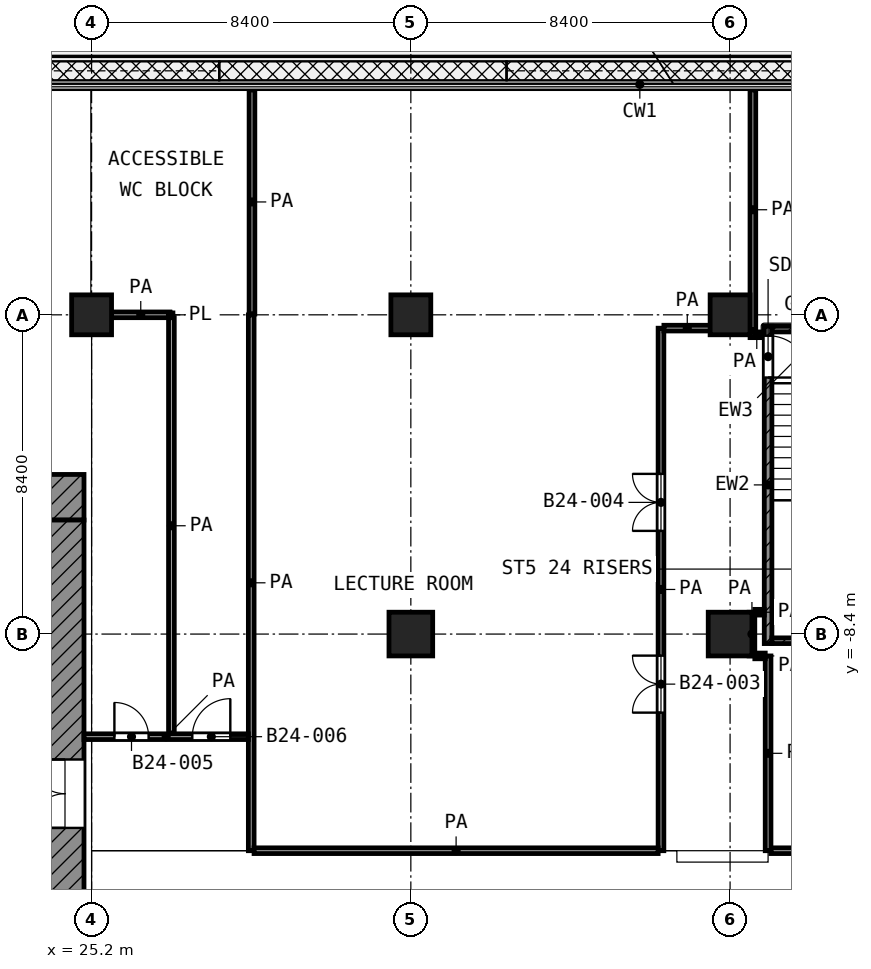
"""IFC4 building model, lengths in metres.
Left out: names, types, materials, properties, quantities, classifications, styles, units other than length and angle.
Written with IfcOpenShell. Run it as: python <this file> out.ifc"""

import sys

from ifc_helpers import new_model, si_unit, direction, frame, frame_2d, origin, origin_2d, place, context, subcontext, project, spatial, rectangle, extrude, element, fill, save


model = new_model("IFC4")
c1 = context("Model", 3, precision=1e-05, world=origin(), true_north=direction((0.0, 1.0)))
c2 = subcontext(c1, "Body", "Model", "MODEL_VIEW")
j1 = project(units=[si_unit("LENGTHUNIT", "METRE"), si_unit("PLANEANGLEUNIT", "RADIAN")], contexts=[c1])
p1 = place(None, origin())
s1 = spatial("IfcSite", under=j1, at=p1, CompositionType="ELEMENT")
p2 = place(p1, origin())
s2 = spatial("IfcBuilding", under=s1, at=p2, CompositionType="ELEMENT")
p3 = place(p2, frame((0.0, 0.0, 107.2)))
s3 = spatial("IfcBuildingStorey", under=s2, at=p3, CompositionType="ELEMENT", Elevation=107.2)
for number, where, z_axis, x_axis in (
    (1, (25.2, 0.0, 0.0), (0.0, 0.0, 1.0), (1.0, 0.0, 0.0)),
    (2, (33.6, 0.0, 0.0), (0.0, 0.0, 1.0), (1.0, 0.0, 0.0)),
    (3, (42.0, 0.0, 0.0), (0.0, 0.0, 1.0), (1.0, 0.0, 0.0)),
):
    element("IfcColumn", number, at=place(p3, frame(where, z_axis=z_axis, x_axis=x_axis)), inside=s3, PredefinedType="COLUMN", context=c2, shape_type="SweptSolid", body=[
        extrude(rectangle(XDim=1.05, YDim=1.05, at=origin_2d()), origin(), (0.0, 0.0, 1.0), 4.2),
    ])
for number, where, z_axis, x_axis in (
    (4, (33.6, -8.4, 0.0), (0.0, 0.0, 1.0), (1.0, 0.0, 0.0)),
    (5, (42.0, -8.4, 0.0), (0.0, 0.0, 1.0), (1.0, 0.0, 0.0)),
):
    element("IfcColumn", number, at=place(p3, frame(where, z_axis=z_axis, x_axis=x_axis)), inside=s3, PredefinedType="COLUMN", context=c2, shape_type="SweptSolid", body=[
        extrude(rectangle(XDim=1.15, YDim=1.15, at=origin_2d()), origin(), (0.0, 0.0, 1.0), 4.2),
    ])
p4 = place(p3, frame((4.2, -4.8, 0.0), z_axis=(0.0, 0.0, 1.0), x_axis=(1.0, 0.0, 0.0)))
e6 = element("IfcWall", 6, at=p4, inside=s3, PredefinedType="SHEAR", context=c2, shape_type="SweptSolid", body=[
    extrude(rectangle(XDim=20.8, YDim=1.2, at=frame_2d((10.4, 0.0))), origin(), (0.0, 0.0, 1.0), 3.6),
])
p5 = place(p4, frame((1.95, 0.0, 0.0)))
e7 = element("IfcOpeningElement", 7, at=p5, cuts=e6, PredefinedType="OPENING", context=c2, shape_type="SweptSolid", body=[
    extrude(rectangle(XDim=1.1, YDim=2.1, at=frame_2d((0.55, 1.05))), frame((0.0, 0.61, 0.0), z_axis=(0.0, -1.0, 0.0), x_axis=(1.0, 0.0, 0.0)), (0.0, 0.0, 1.0), 1.22),
])
p6 = place(p4, frame((17.95, 0.0, 0.0)))
e8 = element("IfcOpeningElement", 8, at=p6, cuts=e6, PredefinedType="OPENING", context=c2, shape_type="SweptSolid", body=[
    extrude(rectangle(XDim=1.1, YDim=2.1, at=frame_2d((0.55, 1.05))), frame((0.0, 0.61, 0.0), z_axis=(0.0, -1.0, 0.0), x_axis=(1.0, 0.0, 0.0)), (0.0, 0.0, 1.0), 1.22),
])
p7 = place(p3, frame((24.5, -24.0, 0.0), z_axis=(0.0, 0.0, 1.0), x_axis=(0.0, 1.0, 0.0)))
e9 = element("IfcWall", 9, at=p7, inside=s3, PredefinedType="SHEAR", context=c2, shape_type="SweptSolid", body=[
    extrude(rectangle(XDim=18.6, YDim=1.0, at=frame_2d((9.3, 0.0))), origin(), (0.0, 0.0, 1.0), 3.6),
])
p8 = place(p7, frame((10.5, 0.0, 0.0)))
e10 = element("IfcOpeningElement", 10, at=p8, cuts=e9, PredefinedType="OPENING", context=c2, shape_type="SweptSolid", body=[
    extrude(rectangle(XDim=1.8, YDim=2.1, at=frame_2d((0.9, 1.05))), frame((0.0, 0.51, 0.0), z_axis=(0.0, -1.0, 0.0), x_axis=(1.0, 0.0, 0.0)), (0.0, 0.0, 1.0), 1.02),
])
p9 = place(p3, frame((43.0, -8.65, 0.0), z_axis=(0.0, 0.0, 1.0), x_axis=(0.0, 1.0, 0.0)))
e11 = element("IfcWall", 11, at=p9, inside=s3, PredefinedType="SHEAR", context=c2, shape_type="SweptSolid", body=[
    extrude(rectangle(XDim=8.35, YDim=0.2, at=frame_2d((4.175, 0.0))), origin(), (0.0, 0.0, 1.0), 3.6),
])
p10 = place(p9, frame((7.0, 0.0, 0.0)))
e12 = element("IfcOpeningElement", 12, at=p10, cuts=e11, PredefinedType="OPENING", context=c2, shape_type="SweptSolid", body=[
    extrude(rectangle(XDim=1.1, YDim=2.1, at=frame_2d((0.55, 1.05))), frame((0.0, 0.11, 0.0), z_axis=(0.0, -1.0, 0.0), x_axis=(1.0, 0.0, 0.0)), (0.0, 0.0, 1.0), 0.22),
])
for number, where, z_axis, x_axis in (
    (13, (43.1, -0.375, 0.0), (0.0, 0.0, 1.0), (1.0, 0.0, 0.0)),
    (14, (43.1, -8.575, 0.0), (0.0, 0.0, 1.0), (1.0, 0.0, 0.0)),
):
    element("IfcWall", number, at=place(p3, frame(where, z_axis=z_axis, x_axis=x_axis)), inside=s3, PredefinedType="SHEAR", context=c2, shape_type="SweptSolid", body=[
        extrude(rectangle(XDim=2.85, YDim=0.15, at=frame_2d((1.425, 0.0))), origin(), (0.0, 0.0, 1.0), 3.6),
    ])
p11 = place(p3, frame((27.22, 0.0, 0.0), z_axis=(0.0, 0.0, 1.0), x_axis=(1.0, 0.0, 0.0)))
e15 = element("IfcWall", 15, at=p11, inside=s3, PredefinedType="PARTITIONING", context=c2, shape_type="SweptSolid", body=[
    extrude(rectangle(XDim=0.12, YDim=0.1, at=frame_2d((0.06, 0.0))), origin(), (0.0, 0.0, 1.0), 3.6),
])
p12 = place(p3, frame((29.475, -14.1, 0.0), z_axis=(0.0, 0.0, 1.0), x_axis=(1.0, 0.0, 0.0)))
e16 = element("IfcWall", 16, at=p12, inside=s3, PredefinedType="PARTITIONING", context=c2, shape_type="SweptSolid", body=[
    extrude(rectangle(XDim=10.632, YDim=0.15, at=frame_2d((5.316, 0.0))), origin(), (0.0, 0.0, 1.0), 3.6),
])
p13 = place(p3, frame((43.075, -14.1, 0.0), z_axis=(0.0, 0.0, 1.0), x_axis=(1.0, 0.0, 0.0)))
e17 = element("IfcWall", 17, at=p13, inside=s3, PredefinedType="PARTITIONING", context=c2, shape_type="SweptSolid", body=[
    extrude(rectangle(XDim=5.375, YDim=0.15, at=frame_2d((2.688, 0.0))), origin(), (0.0, 0.0, 1.0), 3.6),
])
p14 = place(p13, frame((2.188, 0.0, 0.0)))
e18 = element("IfcOpeningElement", 18, at=p14, cuts=e17, PredefinedType="OPENING", context=c2, shape_type="SweptSolid", body=[
    extrude(rectangle(XDim=1.0, YDim=2.1, at=frame_2d((0.5, 1.05))), frame((0.0, 0.085, 0.0), z_axis=(0.0, -1.0, 0.0), x_axis=(1.0, 0.0, 0.0)), (0.0, 0.0, 1.0), 0.17),
])
p15 = place(p3, frame((25.0, -11.1, 0.0), z_axis=(0.0, 0.0, 1.0), x_axis=(1.0, 0.0, 0.0)))
e19 = element("IfcWall", 19, at=p15, inside=s3, PredefinedType="PARTITIONING", context=c2, shape_type="SweptSolid", body=[
    extrude(rectangle(XDim=4.325, YDim=0.15, at=frame_2d((2.163, 0.0))), origin(), (0.0, 0.0, 1.0), 3.6),
])
p16 = place(p15, frame((0.8, 0.0, 0.0)))
e20 = element("IfcOpeningElement", 20, at=p16, cuts=e19, PredefinedType="OPENING", context=c2, shape_type="SweptSolid", body=[
    extrude(rectangle(XDim=0.9, YDim=2.1, at=frame_2d((0.45, 1.05))), frame((0.0, 0.085, 0.0), z_axis=(0.0, -1.0, 0.0), x_axis=(1.0, 0.0, 0.0)), (0.0, 0.0, 1.0), 0.17),
])
p17 = place(p15, frame((2.85, 0.0, 0.0)))
e21 = element("IfcOpeningElement", 21, at=p17, cuts=e19, PredefinedType="OPENING", context=c2, shape_type="SweptSolid", body=[
    extrude(rectangle(XDim=1.0, YDim=2.1, at=frame_2d((0.5, 1.05))), frame((0.0, 0.085, 0.0), z_axis=(0.0, -1.0, 0.0), x_axis=(1.0, 0.0, 0.0)), (0.0, 0.0, 1.0), 0.17),
])
p18 = place(p3, frame((42.651, -8.975, 0.0), z_axis=(0.0, 0.0, 1.0), x_axis=(1.0, 0.0, 0.0)))
e22 = element("IfcWall", 22, at=p18, inside=s3, PredefinedType="PARTITIONING", context=c2, shape_type="SweptSolid", body=[
    extrude(rectangle(XDim=0.274, YDim=0.15, at=frame_2d((0.137, 0.0))), origin(), (0.0, 0.0, 1.0), 3.6),
])
p19 = place(p3, frame((42.651, -7.825, 0.0), z_axis=(0.0, 0.0, 1.0), x_axis=(1.0, 0.0, 0.0)))
e23 = element("IfcWall", 23, at=p19, inside=s3, PredefinedType="PARTITIONING", context=c2, shape_type="SweptSolid", body=[
    extrude(rectangle(XDim=0.249, YDim=0.15, at=frame_2d((0.125, 0.0))), origin(), (0.0, 0.0, 1.0), 3.6),
])
p20 = place(p3, frame((42.526, -0.525, 0.0), z_axis=(0.0, 0.0, 1.0), x_axis=(1.0, 0.0, 0.0)))
e24 = element("IfcWall", 24, at=p20, inside=s3, PredefinedType="PARTITIONING", context=c2, shape_type="SweptSolid", body=[
    extrude(rectangle(XDim=0.353, YDim=0.15, at=frame_2d((0.177, 0.0))), origin(), (0.0, 0.0, 1.0), 3.6),
])
p21 = place(p3, frame((40.259, -0.35, 0.0), z_axis=(0.0, 0.0, 1.0), x_axis=(1.0, 0.0, 0.0)))
e25 = element("IfcWall", 25, at=p21, inside=s3, PredefinedType="PARTITIONING", context=c2, shape_type="SweptSolid", body=[
    extrude(rectangle(XDim=1.229, YDim=0.15, at=frame_2d((0.615, 0.0))), origin(), (0.0, 0.0, 1.0), 3.6),
])
p22 = place(p3, frame((25.727, 0.0, 0.0), z_axis=(0.0, 0.0, 1.0), x_axis=(1.0, 0.0, 0.0)))
e26 = element("IfcWall", 26, at=p22, inside=s3, PredefinedType="PARTITIONING", context=c2, shape_type="SweptSolid", body=[
    extrude(rectangle(XDim=1.533, YDim=0.15, at=frame_2d((0.767, 0.0))), origin(), (0.0, 0.0, 1.0), 3.6),
])
p23 = place(p3, frame((27.3, -11.025, 0.0), z_axis=(0.0, 0.0, 1.0), x_axis=(0.0, 1.0, 0.0)))
e27 = element("IfcWall", 27, at=p23, inside=s3, PredefinedType="PARTITIONING", context=c2, shape_type="SweptSolid", body=[
    extrude(rectangle(XDim=10.95, YDim=0.15, at=frame_2d((5.475, 0.0))), origin(), (0.0, 0.0, 1.0), 3.6),
])
p24 = place(p3, frame((29.4, -14.1, 0.0), z_axis=(0.0, 0.0, 1.0), x_axis=(0.0, 1.0, 0.0)))
e28 = element("IfcWall", 28, at=p24, inside=s3, PredefinedType="PARTITIONING", context=c2, shape_type="SweptSolid", body=[
    extrude(rectangle(XDim=14.098, YDim=0.15, at=frame_2d((7.049, 0.0))), origin(), (0.0, 0.0, 1.0), 3.6),
])
p25 = place(p3, frame((29.42, 0.02, 0.0), z_axis=(0.0, 0.0, 1.0), x_axis=(0.0, 1.0, 0.0)))
e29 = element("IfcWall", 29, at=p25, inside=s3, PredefinedType="PARTITIONING", context=c2, shape_type="SweptSolid", body=[
    extrude(rectangle(XDim=5.9, YDim=0.15, at=frame_2d((2.95, 0.0))), origin(), (0.0, 0.0, 1.0), 3.6),
])
p26 = place(p3, frame((40.182, -14.1, 0.0), z_axis=(0.0, 0.0, 1.0), x_axis=(0.0, 1.0, 0.0)))
e30 = element("IfcWall", 30, at=p26, inside=s3, PredefinedType="PARTITIONING", context=c2, shape_type="SweptSolid", body=[
    extrude(rectangle(XDim=13.748, YDim=0.15, at=frame_2d((6.874, 0.0))), origin(), (0.0, 0.0, 1.0), 3.6),
])
p27 = place(p26, frame((3.633, 0.0, 0.0)))
e31 = element("IfcOpeningElement", 31, at=p27, cuts=e30, PredefinedType="OPENING", context=c2, shape_type="SweptSolid", body=[
    extrude(rectangle(XDim=1.5, YDim=2.1, at=frame_2d((0.75, 1.05))), frame((0.0, 0.085, 0.0), z_axis=(0.0, -1.0, 0.0), x_axis=(1.0, 0.0, 0.0)), (0.0, 0.0, 1.0), 0.17),
])
p28 = place(p26, frame((8.415, 0.0, 0.0)))
e32 = element("IfcOpeningElement", 32, at=p28, cuts=e30, PredefinedType="OPENING", context=c2, shape_type="SweptSolid", body=[
    extrude(rectangle(XDim=1.5, YDim=2.1, at=frame_2d((0.75, 1.05))), frame((0.0, 0.085, 0.0), z_axis=(0.0, -1.0, 0.0), x_axis=(1.0, 0.0, 0.0)), (0.0, 0.0, 1.0), 0.17),
])
p29 = place(p3, frame((42.575, -8.974, 0.0), z_axis=(0.0, 0.0, 1.0), x_axis=(0.0, 1.0, 0.0)))
e33 = element("IfcWall", 33, at=p29, inside=s3, PredefinedType="PARTITIONING", context=c2, shape_type="SweptSolid", body=[
    extrude(rectangle(XDim=1.148, YDim=0.15, at=frame_2d((0.574, 0.0))), origin(), (0.0, 0.0, 1.0), 3.6),
])
p30 = place(p3, frame((42.6, -0.39, 0.0), z_axis=(0.0, 0.0, 1.0), x_axis=(0.0, 1.0, 0.0)))
e34 = element("IfcWall", 34, at=p30, inside=s3, PredefinedType="PARTITIONING", context=c2, shape_type="SweptSolid", body=[
    extrude(rectangle(XDim=6.31, YDim=0.15, at=frame_2d((3.155, 0.0))), origin(), (0.0, 0.0, 1.0), 3.6),
])
p31 = place(p3, frame((43.0, -14.1, 0.0), z_axis=(0.0, 0.0, 1.0), x_axis=(0.0, 1.0, 0.0)))
e35 = element("IfcWall", 35, at=p31, inside=s3, PredefinedType="PARTITIONING", context=c2, shape_type="SweptSolid", body=[
    extrude(rectangle(XDim=5.125, YDim=0.15, at=frame_2d((2.562, 0.0))), origin(), (0.0, 0.0, 1.0), 3.6),
])
p32 = place(p8, origin())
e36 = element("IfcDoor", 36, at=p32, inside=s3, OperationType="DOUBLE_DOOR_SINGLE_SWING", PredefinedType="DOOR", context=c2, shape_type="SweptSolid", body=[
    extrude(rectangle(XDim=1.8, YDim=2.1, at=frame_2d((0.9, 1.05))), frame((0.0, 0.025, 0.0), z_axis=(0.0, -1.0, 0.0), x_axis=(1.0, 0.0, 0.0)), (0.0, 0.0, 1.0), 0.05),
])
fill(e10, e36)
p33 = place(p10, frame((1.1, 0.0, 0.0), z_axis=(0.0, 0.0, 1.0), x_axis=(-1.0, 0.0, 0.0)))
e37 = element("IfcDoor", 37, at=p33, inside=s3, OperationType="SINGLE_SWING_LEFT", PredefinedType="DOOR", context=c2, shape_type="SweptSolid", body=[
    extrude(rectangle(XDim=1.1, YDim=2.1, at=frame_2d((0.55, 1.05))), frame((0.0, 0.025, 0.0), z_axis=(0.0, -1.0, 0.0), x_axis=(1.0, 0.0, 0.0)), (0.0, 0.0, 1.0), 0.05),
])
fill(e12, e37)
p34 = place(p16, origin())
e38 = element("IfcDoor", 38, at=p34, inside=s3, OperationType="SINGLE_SWING_LEFT", PredefinedType="DOOR", context=c2, shape_type="SweptSolid", body=[
    extrude(rectangle(XDim=0.9, YDim=2.1, at=frame_2d((0.45, 1.05))), frame((0.0, 0.025, 0.0), z_axis=(0.0, -1.0, 0.0), x_axis=(1.0, 0.0, 0.0)), (0.0, 0.0, 1.0), 0.05),
])
fill(e20, e38)
p35 = place(p17, origin())
e39 = element("IfcDoor", 39, at=p35, inside=s3, OperationType="SINGLE_SWING_RIGHT", PredefinedType="DOOR", context=c2, shape_type="SweptSolid", body=[
    extrude(rectangle(XDim=1.0, YDim=2.1, at=frame_2d((0.5, 1.05))), frame((0.0, 0.025, 0.0), z_axis=(0.0, -1.0, 0.0), x_axis=(1.0, 0.0, 0.0)), (0.0, 0.0, 1.0), 0.05),
])
fill(e21, e39)
p36 = place(p27, origin())
e40 = element("IfcDoor", 40, at=p36, inside=s3, OperationType="DOUBLE_DOOR_SINGLE_SWING", PredefinedType="DOOR", context=c2, shape_type="SweptSolid", body=[
    extrude(rectangle(XDim=1.5, YDim=2.1, at=frame_2d((0.75, 1.05))), frame((0.0, 0.025, 0.0), z_axis=(0.0, -1.0, 0.0), x_axis=(1.0, 0.0, 0.0)), (0.0, 0.0, 1.0), 0.05),
])
fill(e31, e40)
p37 = place(p28, origin())
e41 = element("IfcDoor", 41, at=p37, inside=s3, OperationType="DOUBLE_DOOR_SINGLE_SWING", PredefinedType="DOOR", context=c2, shape_type="SweptSolid", body=[
    extrude(rectangle(XDim=1.5, YDim=2.1, at=frame_2d((0.75, 1.05))), frame((0.0, 0.025, 0.0), z_axis=(0.0, -1.0, 0.0), x_axis=(1.0, 0.0, 0.0)), (0.0, 0.0, 1.0), 0.05),
])
fill(e32, e41)
save(model, sys.argv[1])
